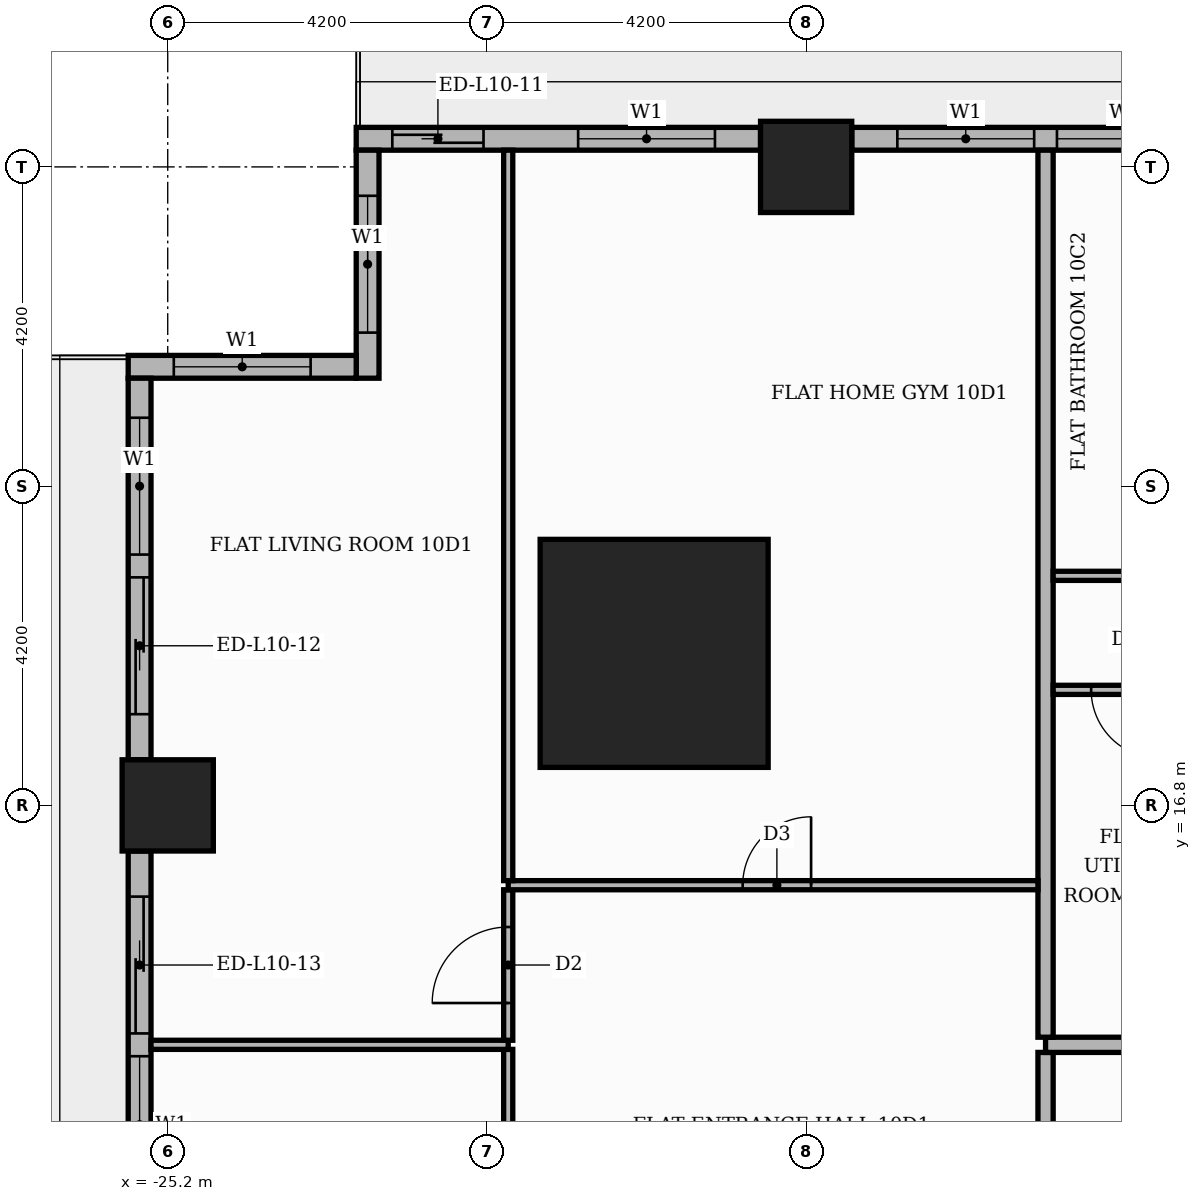
"""IFC4 building model, lengths in metres.
Left out: names, types, materials, properties, quantities, classifications, styles, units other than length and angle.
Written with IfcOpenShell. Run it as: python <this file> out.ifc"""

import sys

from ifc_helpers import new_model, si_unit, direction, frame, frame_2d, origin, origin_2d, place, context, subcontext, project, spatial, rectangle, extrude, element, fill, save


model = new_model("IFC4")
c1 = context("Model", 3, precision=1e-05, world=origin(), true_north=direction((0.0, 1.0)))
c2 = subcontext(c1, "Body", "Model", "MODEL_VIEW")
j1 = project(units=[si_unit("LENGTHUNIT", "METRE"), si_unit("PLANEANGLEUNIT", "RADIAN")], contexts=[c1])
p1 = place(None, origin())
s1 = spatial("IfcSite", under=j1, at=p1, CompositionType="ELEMENT")
p2 = place(p1, origin())
s2 = spatial("IfcBuilding", under=s1, at=p2, CompositionType="ELEMENT")
p3 = place(p2, frame((0.0, 0.0, 46.5)))
s3 = spatial("IfcBuildingStorey", under=s2, at=p3, CompositionType="ELEMENT", Elevation=46.5)
p4 = place(p3, frame((-18.8, 18.8, 0.0), z_axis=(0.0, 0.0, 1.0), x_axis=(1.0, 0.0, 0.0)))
e1 = element("IfcColumn", 1, at=p4, inside=s3, PredefinedType="COLUMN", context=c2, shape_type="SweptSolid", body=[
    extrude(rectangle(XDim=3.0, YDim=3.0, at=origin_2d()), origin(), (0.0, 0.0, 1.0), 3.9),
])
for number, where, z_axis, x_axis in (
    (2, (-16.8, 25.2, 0.0), (0.0, 0.0, 1.0), (1.0, 0.0, 0.0)),
    (3, (-25.2, 16.8, 0.0), (0.0, 0.0, 1.0), (1.0, 0.0, 0.0)),
):
    element("IfcColumn", number, at=place(p3, frame(where, z_axis=z_axis, x_axis=x_axis)), inside=s3, PredefinedType="COLUMN", context=c2, shape_type="SweptSolid", body=[
        extrude(rectangle(XDim=1.2, YDim=1.2, at=origin_2d()), origin(), (0.0, 0.0, 1.0), 3.9),
    ])
p5 = place(p3, frame((-9.0, 25.57, 0.0), z_axis=(0.0, 0.0, 1.0), x_axis=(-1.0, 0.0, 0.0)))
e4 = element("IfcWall", 4, at=p5, inside=s3, PredefinedType="STANDARD", context=c2, shape_type="SweptSolid", body=[
    extrude(rectangle(XDim=7.2, YDim=0.3, at=frame_2d((3.6, 0.0))), origin(), (0.0, 0.0, 1.0), 3.48),
])
p6 = place(p5, frame((0.6, 0.0, 0.9)))
e5 = element("IfcOpeningElement", 5, at=p6, cuts=e4, PredefinedType="OPENING", context=c2, shape_type="SweptSolid", body=[
    extrude(rectangle(XDim=1.8, YDim=2.1, at=frame_2d((0.9, 1.05))), frame((0.0, 0.16, 0.0), z_axis=(0.0, -1.0, 0.0), x_axis=(1.0, 0.0, 0.0)), (0.0, 0.0, 1.0), 0.32),
])
p7 = place(p5, frame((2.7, 0.0, 0.9)))
e6 = element("IfcOpeningElement", 6, at=p7, cuts=e4, PredefinedType="OPENING", context=c2, shape_type="SweptSolid", body=[
    extrude(rectangle(XDim=1.8, YDim=2.1, at=frame_2d((0.9, 1.05))), frame((0.0, 0.16, 0.0), z_axis=(0.0, -1.0, 0.0), x_axis=(1.0, 0.0, 0.0)), (0.0, 0.0, 1.0), 0.32),
])
p8 = place(p5, frame((4.8, 0.0, 0.9)))
e7 = element("IfcOpeningElement", 7, at=p8, cuts=e4, PredefinedType="OPENING", context=c2, shape_type="SweptSolid", body=[
    extrude(rectangle(XDim=1.8, YDim=2.1, at=frame_2d((0.9, 1.05))), frame((0.0, 0.16, 0.0), z_axis=(0.0, -1.0, 0.0), x_axis=(1.0, 0.0, 0.0)), (0.0, 0.0, 1.0), 0.32),
])
p9 = place(p3, frame((-17.4, 25.57, 0.0), z_axis=(0.0, 0.0, 1.0), x_axis=(-1.0, 0.0, 0.0)))
e8 = element("IfcWall", 8, at=p9, inside=s3, PredefinedType="STANDARD", context=c2, shape_type="SweptSolid", body=[
    extrude(rectangle(XDim=5.32, YDim=0.3, at=frame_2d((2.66, 0.0))), origin(), (0.0, 0.0, 1.0), 3.48),
])
p10 = place(p9, frame((0.6, 0.0, 0.9)))
e9 = element("IfcOpeningElement", 9, at=p10, cuts=e8, PredefinedType="OPENING", context=c2, shape_type="SweptSolid", body=[
    extrude(rectangle(XDim=1.8, YDim=2.1, at=frame_2d((0.9, 1.05))), frame((0.0, 0.16, 0.0), z_axis=(0.0, -1.0, 0.0), x_axis=(1.0, 0.0, 0.0)), (0.0, 0.0, 1.0), 0.32),
])
p11 = place(p9, frame((3.645, 0.0, 0.0)))
e10 = element("IfcOpeningElement", 10, at=p11, cuts=e8, PredefinedType="OPENING", context=c2, shape_type="SweptSolid", body=[
    extrude(rectangle(XDim=1.2, YDim=2.4, at=frame_2d((0.6, 1.2))), frame((0.0, 0.16, 0.0), z_axis=(0.0, -1.0, 0.0), x_axis=(1.0, 0.0, 0.0)), (0.0, 0.0, 1.0), 0.32),
])
p12 = place(p3, frame((-22.57, 25.42, 0.0), z_axis=(0.0, 0.0, 1.0), x_axis=(0.0, -1.0, 0.0)))
e11 = element("IfcWall", 11, at=p12, inside=s3, PredefinedType="STANDARD", context=c2, shape_type="SweptSolid", body=[
    extrude(rectangle(XDim=3.0, YDim=0.3, at=frame_2d((1.5, 0.0))), origin(), (0.0, 0.0, 1.0), 3.48),
])
p13 = place(p12, frame((0.6, 0.0, 0.9)))
e12 = element("IfcOpeningElement", 12, at=p13, cuts=e11, PredefinedType="OPENING", context=c2, shape_type="SweptSolid", body=[
    extrude(rectangle(XDim=1.8, YDim=2.1, at=frame_2d((0.9, 1.05))), frame((0.0, 0.16, 0.0), z_axis=(0.0, -1.0, 0.0), x_axis=(1.0, 0.0, 0.0)), (0.0, 0.0, 1.0), 0.32),
])
p14 = place(p3, frame((-22.72, 22.57, 0.0), z_axis=(0.0, 0.0, 1.0), x_axis=(-1.0, 0.0, 0.0)))
e13 = element("IfcWall", 13, at=p14, inside=s3, PredefinedType="STANDARD", context=c2, shape_type="SweptSolid", body=[
    extrude(rectangle(XDim=3.0, YDim=0.3, at=frame_2d((1.5, 0.0))), origin(), (0.0, 0.0, 1.0), 3.48),
])
p15 = place(p14, frame((0.6, 0.0, 0.9)))
e14 = element("IfcOpeningElement", 14, at=p15, cuts=e13, PredefinedType="OPENING", context=c2, shape_type="SweptSolid", body=[
    extrude(rectangle(XDim=1.8, YDim=2.1, at=frame_2d((0.9, 1.05))), frame((0.0, 0.16, 0.0), z_axis=(0.0, -1.0, 0.0), x_axis=(1.0, 0.0, 0.0)), (0.0, 0.0, 1.0), 0.32),
])
p16 = place(p3, frame((-25.57, 22.42, 0.0), z_axis=(0.0, 0.0, 1.0), x_axis=(0.0, -1.0, 0.0)))
e15 = element("IfcWall", 15, at=p16, inside=s3, PredefinedType="STANDARD", context=c2, shape_type="SweptSolid", body=[
    extrude(rectangle(XDim=5.02, YDim=0.3, at=frame_2d((2.51, 0.0))), origin(), (0.0, 0.0, 1.0), 3.48),
])
p17 = place(p16, frame((0.52, 0.0, 0.9)))
e16 = element("IfcOpeningElement", 16, at=p17, cuts=e15, PredefinedType="OPENING", context=c2, shape_type="SweptSolid", body=[
    extrude(rectangle(XDim=1.8, YDim=2.1, at=frame_2d((0.9, 1.05))), frame((0.0, 0.16, 0.0), z_axis=(0.0, -1.0, 0.0), x_axis=(1.0, 0.0, 0.0)), (0.0, 0.0, 1.0), 0.32),
])
p18 = place(p16, frame((2.62, 0.0, 0.0)))
e17 = element("IfcOpeningElement", 17, at=p18, cuts=e15, PredefinedType="OPENING", context=c2, shape_type="SweptSolid", body=[
    extrude(rectangle(XDim=1.8, YDim=2.4, at=frame_2d((0.9, 1.2))), frame((0.0, 0.16, 0.0), z_axis=(0.0, -1.0, 0.0), x_axis=(1.0, 0.0, 0.0)), (0.0, 0.0, 1.0), 0.32),
])
p19 = place(p3, frame((-25.57, 16.2, 0.0), z_axis=(0.0, 0.0, 1.0), x_axis=(0.0, -1.0, 0.0)))
e18 = element("IfcWall", 18, at=p19, inside=s3, PredefinedType="STANDARD", context=c2, shape_type="SweptSolid", body=[
    extrude(rectangle(XDim=7.2, YDim=0.3, at=frame_2d((3.6, 0.0))), origin(), (0.0, 0.0, 1.0), 3.48),
])
p20 = place(p19, frame((0.6, 0.0, 0.0)))
e19 = element("IfcOpeningElement", 19, at=p20, cuts=e18, PredefinedType="OPENING", context=c2, shape_type="SweptSolid", body=[
    extrude(rectangle(XDim=1.8, YDim=2.4, at=frame_2d((0.9, 1.2))), frame((0.0, 0.16, 0.0), z_axis=(0.0, -1.0, 0.0), x_axis=(1.0, 0.0, 0.0)), (0.0, 0.0, 1.0), 0.32),
])
p21 = place(p19, frame((2.7, 0.0, 0.9)))
e20 = element("IfcOpeningElement", 20, at=p21, cuts=e18, PredefinedType="OPENING", context=c2, shape_type="SweptSolid", body=[
    extrude(rectangle(XDim=1.8, YDim=2.1, at=frame_2d((0.9, 1.05))), frame((0.0, 0.16, 0.0), z_axis=(0.0, -1.0, 0.0), x_axis=(1.0, 0.0, 0.0)), (0.0, 0.0, 1.0), 0.32),
])
p22 = place(p19, frame((4.8, 0.0, 0.0)))
e21 = element("IfcOpeningElement", 21, at=p22, cuts=e18, PredefinedType="OPENING", context=c2, shape_type="SweptSolid", body=[
    extrude(rectangle(XDim=1.8, YDim=2.4, at=frame_2d((0.9, 1.2))), frame((0.0, 0.16, 0.0), z_axis=(0.0, -1.0, 0.0), x_axis=(1.0, 0.0, 0.0)), (0.0, 0.0, 1.0), 0.32),
])
p23 = place(p3, frame((-13.65, -13.55, 0.0), z_axis=(0.0, 0.0, 1.0), x_axis=(0.0, 1.0, 0.0)))
e22 = element("IfcWall", 22, at=p23, inside=s3, PredefinedType="PARTITIONING", context=c2, shape_type="SweptSolid", body=[
    extrude(rectangle(XDim=27.1, YDim=0.2, at=frame_2d((13.55, 0.0))), origin(), (0.0, 0.0, 1.0), 3.48),
])
p24 = place(p23, frame((24.55, 0.0, 0.0)))
e23 = element("IfcOpeningElement", 23, at=p24, cuts=e22, PredefinedType="OPENING", context=c2, shape_type="SweptSolid", body=[
    extrude(rectangle(XDim=1.1, YDim=2.4, at=frame_2d((0.55, 1.2))), frame((0.0, 0.11, 0.0), z_axis=(0.0, -1.0, 0.0), x_axis=(1.0, 0.0, 0.0)), (0.0, 0.0, 1.0), 0.22),
])
p25 = place(p3, frame((-20.72, 5.31, 0.0), z_axis=(0.0, 0.0, 1.0), x_axis=(0.0, 1.0, 0.0)))
e24 = element("IfcWall", 24, at=p25, inside=s3, PredefinedType="PARTITIONING", context=c2, shape_type="SweptSolid", body=[
    extrude(rectangle(XDim=8.28, YDim=0.12, at=frame_2d((4.14, 0.0))), origin(), (0.0, 0.0, 1.0), 3.48),
])
p26 = place(p25, frame((3.64, 0.0, 0.0)))
e25 = element("IfcOpeningElement", 25, at=p26, cuts=e24, PredefinedType="OPENING", context=c2, shape_type="SweptSolid", body=[
    extrude(rectangle(XDim=1.0, YDim=2.1, at=frame_2d((0.5, 1.05))), frame((0.0, 0.07, 0.0), z_axis=(0.0, -1.0, 0.0), x_axis=(1.0, 0.0, 0.0)), (0.0, 0.0, 1.0), 0.14),
])
p27 = place(p3, frame((-25.42, 13.65, 0.0), z_axis=(0.0, 0.0, 1.0), x_axis=(1.0, 0.0, 0.0)))
e26 = element("IfcWall", 26, at=p27, inside=s3, PredefinedType="PARTITIONING", context=c2, shape_type="SweptSolid", body=[
    extrude(rectangle(XDim=4.7, YDim=0.12, at=frame_2d((2.35, 0.0))), origin(), (0.0, 0.0, 1.0), 3.48),
])
p28 = place(p3, frame((-13.65, 13.65, 0.0), z_axis=(0.0, 0.0, 1.0), x_axis=(1.0, 0.0, 0.0)))
e27 = element("IfcWall", 27, at=p28, inside=s3, PredefinedType="PARTITIONING", context=c2, shape_type="SweptSolid", body=[
    extrude(rectangle(XDim=39.07, YDim=0.2, at=frame_2d((19.535, 0.0))), origin(), (0.0, 0.0, 1.0), 3.48),
])
p29 = place(p28, frame((24.65, 0.0, 0.0)))
e28 = element("IfcOpeningElement", 28, at=p29, cuts=e27, PredefinedType="OPENING", context=c2, shape_type="SweptSolid", body=[
    extrude(rectangle(XDim=1.1, YDim=2.4, at=frame_2d((0.55, 1.2))), frame((0.0, 0.11, 0.0), z_axis=(0.0, -1.0, 0.0), x_axis=(1.0, 0.0, 0.0)), (0.0, 0.0, 1.0), 0.22),
])
p30 = place(p28, frame((14.15, 0.0, 0.0)))
e29 = element("IfcOpeningElement", 29, at=p30, cuts=e27, PredefinedType="OPENING", context=c2, shape_type="SweptSolid", body=[
    extrude(rectangle(XDim=1.1, YDim=2.4, at=frame_2d((0.55, 1.2))), frame((0.0, 0.11, 0.0), z_axis=(0.0, -1.0, 0.0), x_axis=(1.0, 0.0, 0.0)), (0.0, 0.0, 1.0), 0.22),
])
p31 = place(p3, frame((-20.72, 13.71, 0.0), z_axis=(0.0, 0.0, 1.0), x_axis=(0.0, 1.0, 0.0)))
e30 = element("IfcWall", 30, at=p31, inside=s3, PredefinedType="PARTITIONING", context=c2, shape_type="SweptSolid", body=[
    extrude(rectangle(XDim=1.98, YDim=0.12, at=frame_2d((0.99, 0.0))), origin(), (0.0, 0.0, 1.0), 3.48),
])
p32 = place(p31, frame((0.49, 0.0, 0.0)))
e31 = element("IfcOpeningElement", 31, at=p32, cuts=e30, PredefinedType="OPENING", context=c2, shape_type="SweptSolid", body=[
    extrude(rectangle(XDim=1.0, YDim=2.1, at=frame_2d((0.5, 1.05))), frame((0.0, 0.07, 0.0), z_axis=(0.0, -1.0, 0.0), x_axis=(1.0, 0.0, 0.0)), (0.0, 0.0, 1.0), 0.14),
])
p33 = place(p3, frame((-13.65, 13.75, 0.0), z_axis=(0.0, 0.0, 1.0), x_axis=(0.0, 1.0, 0.0)))
e32 = element("IfcWall", 32, at=p33, inside=s3, PredefinedType="PARTITIONING", context=c2, shape_type="SweptSolid", body=[
    extrude(rectangle(XDim=11.67, YDim=0.2, at=frame_2d((5.835, 0.0))), origin(), (0.0, 0.0, 1.0), 3.48),
])
p34 = place(p3, frame((-20.72, 15.75, 0.0), z_axis=(0.0, 0.0, 1.0), x_axis=(1.0, 0.0, 0.0)))
e33 = element("IfcWall", 33, at=p34, inside=s3, PredefinedType="PARTITIONING", context=c2, shape_type="SweptSolid", body=[
    extrude(rectangle(XDim=6.97, YDim=0.12, at=frame_2d((3.485, 0.0))), origin(), (0.0, 0.0, 1.0), 3.48),
])
p35 = place(p34, frame((3.085, 0.0, 0.0)))
e34 = element("IfcOpeningElement", 34, at=p35, cuts=e33, PredefinedType="OPENING", context=c2, shape_type="SweptSolid", body=[
    extrude(rectangle(XDim=0.9, YDim=2.1, at=frame_2d((0.45, 1.05))), frame((0.0, 0.07, 0.0), z_axis=(0.0, -1.0, 0.0), x_axis=(1.0, 0.0, 0.0)), (0.0, 0.0, 1.0), 0.14),
])
p36 = place(p3, frame((-20.72, 15.81, 0.0), z_axis=(0.0, 0.0, 1.0), x_axis=(0.0, 1.0, 0.0)))
e35 = element("IfcWall", 35, at=p36, inside=s3, PredefinedType="PARTITIONING", context=c2, shape_type="SweptSolid", body=[
    extrude(rectangle(XDim=9.61, YDim=0.12, at=frame_2d((4.805, 0.0))), origin(), (0.0, 0.0, 1.0), 3.48),
])
p37 = place(p3, frame((-13.55, 18.32, 0.0), z_axis=(0.0, 0.0, 1.0), x_axis=(1.0, 0.0, 0.0)))
e36 = element("IfcWall", 36, at=p37, inside=s3, PredefinedType="PARTITIONING", context=c2, shape_type="SweptSolid", body=[
    extrude(rectangle(XDim=12.5, YDim=0.12, at=frame_2d((6.25, 0.0))), origin(), (0.0, 0.0, 1.0), 3.48),
])
p38 = place(p37, frame((8.825, 0.0, 0.0)))
e37 = element("IfcOpeningElement", 37, at=p38, cuts=e36, PredefinedType="OPENING", context=c2, shape_type="SweptSolid", body=[
    extrude(rectangle(XDim=0.9, YDim=2.1, at=frame_2d((0.45, 1.05))), frame((0.0, 0.07, 0.0), z_axis=(0.0, -1.0, 0.0), x_axis=(1.0, 0.0, 0.0)), (0.0, 0.0, 1.0), 0.14),
])
p39 = place(p37, frame((4.625, 0.0, 0.0)))
e38 = element("IfcOpeningElement", 38, at=p39, cuts=e36, PredefinedType="OPENING", context=c2, shape_type="SweptSolid", body=[
    extrude(rectangle(XDim=0.9, YDim=2.1, at=frame_2d((0.45, 1.05))), frame((0.0, 0.07, 0.0), z_axis=(0.0, -1.0, 0.0), x_axis=(1.0, 0.0, 0.0)), (0.0, 0.0, 1.0), 0.14),
])
p40 = place(p37, frame((2.6, 0.0, 0.0)))
e39 = element("IfcOpeningElement", 39, at=p40, cuts=e36, PredefinedType="OPENING", context=c2, shape_type="SweptSolid", body=[
    extrude(rectangle(XDim=0.9, YDim=2.1, at=frame_2d((0.45, 1.05))), frame((0.0, 0.07, 0.0), z_axis=(0.0, -1.0, 0.0), x_axis=(1.0, 0.0, 0.0)), (0.0, 0.0, 1.0), 0.14),
])
p41 = place(p37, frame((0.5, 0.0, 0.0)))
e40 = element("IfcOpeningElement", 40, at=p41, cuts=e36, PredefinedType="OPENING", context=c2, shape_type="SweptSolid", body=[
    extrude(rectangle(XDim=0.9, YDim=2.1, at=frame_2d((0.45, 1.05))), frame((0.0, 0.07, 0.0), z_axis=(0.0, -1.0, 0.0), x_axis=(1.0, 0.0, 0.0)), (0.0, 0.0, 1.0), 0.14),
])
p42 = place(p3, frame((-13.55, 19.82, 0.0), z_axis=(0.0, 0.0, 1.0), x_axis=(1.0, 0.0, 0.0)))
e41 = element("IfcWall", 41, at=p42, inside=s3, PredefinedType="PARTITIONING", context=c2, shape_type="SweptSolid", body=[
    extrude(rectangle(XDim=18.7, YDim=0.12, at=frame_2d((9.35, 0.0))), origin(), (0.0, 0.0, 1.0), 3.48),
])
p43 = place(p42, frame((16.2, 0.0, 0.0)))
e42 = element("IfcOpeningElement", 42, at=p43, cuts=e41, PredefinedType="OPENING", context=c2, shape_type="SweptSolid", body=[
    extrude(rectangle(XDim=1.0, YDim=2.1, at=frame_2d((0.5, 1.05))), frame((0.0, 0.07, 0.0), z_axis=(0.0, -1.0, 0.0), x_axis=(1.0, 0.0, 0.0)), (0.0, 0.0, 1.0), 0.14),
])
p44 = place(p42, frame((12.05, 0.0, 0.0)))
e43 = element("IfcOpeningElement", 43, at=p44, cuts=e41, PredefinedType="OPENING", context=c2, shape_type="SweptSolid", body=[
    extrude(rectangle(XDim=0.9, YDim=2.1, at=frame_2d((0.45, 1.05))), frame((0.0, 0.07, 0.0), z_axis=(0.0, -1.0, 0.0), x_axis=(1.0, 0.0, 0.0)), (0.0, 0.0, 1.0), 0.14),
])
p45 = place(p42, frame((3.65, 0.0, 0.0)))
e44 = element("IfcOpeningElement", 44, at=p45, cuts=e41, PredefinedType="OPENING", context=c2, shape_type="SweptSolid", body=[
    extrude(rectangle(XDim=0.9, YDim=2.1, at=frame_2d((0.45, 1.05))), frame((0.0, 0.07, 0.0), z_axis=(0.0, -1.0, 0.0), x_axis=(1.0, 0.0, 0.0)), (0.0, 0.0, 1.0), 0.14),
])
p46 = place(p7, origin())
e45 = element("IfcWindow", 45, at=p46, inside=s3, PartitioningType="SINGLE_PANEL", PredefinedType="WINDOW", context=c2, shape_type="SweptSolid", body=[
    extrude(rectangle(XDim=1.8, YDim=2.1, at=frame_2d((0.9, 1.05))), frame((0.0, 0.03, 0.0), z_axis=(0.0, -1.0, 0.0), x_axis=(1.0, 0.0, 0.0)), (0.0, 0.0, 1.0), 0.06),
])
fill(e6, e45)
p47 = place(p8, origin())
e46 = element("IfcWindow", 46, at=p47, inside=s3, PartitioningType="SINGLE_PANEL", PredefinedType="WINDOW", context=c2, shape_type="SweptSolid", body=[
    extrude(rectangle(XDim=1.8, YDim=2.1, at=frame_2d((0.9, 1.05))), frame((0.0, 0.03, 0.0), z_axis=(0.0, -1.0, 0.0), x_axis=(1.0, 0.0, 0.0)), (0.0, 0.0, 1.0), 0.06),
])
fill(e7, e46)
p48 = place(p10, origin())
e47 = element("IfcWindow", 47, at=p48, inside=s3, PartitioningType="SINGLE_PANEL", PredefinedType="WINDOW", context=c2, shape_type="SweptSolid", body=[
    extrude(rectangle(XDim=1.8, YDim=2.1, at=frame_2d((0.9, 1.05))), frame((0.0, 0.03, 0.0), z_axis=(0.0, -1.0, 0.0), x_axis=(1.0, 0.0, 0.0)), (0.0, 0.0, 1.0), 0.06),
])
fill(e9, e47)
p49 = place(p11, origin())
e48 = element("IfcDoor", 48, at=p49, inside=s3, OperationType="SLIDING_TO_RIGHT", PredefinedType="DOOR", context=c2, shape_type="SweptSolid", body=[
    extrude(rectangle(XDim=1.2, YDim=2.4, at=frame_2d((0.6, 1.2))), frame((0.0, 0.025, 0.0), z_axis=(0.0, -1.0, 0.0), x_axis=(1.0, 0.0, 0.0)), (0.0, 0.0, 1.0), 0.05),
])
fill(e10, e48)
p50 = place(p13, origin())
e49 = element("IfcWindow", 49, at=p50, inside=s3, PartitioningType="SINGLE_PANEL", PredefinedType="WINDOW", context=c2, shape_type="SweptSolid", body=[
    extrude(rectangle(XDim=1.8, YDim=2.1, at=frame_2d((0.9, 1.05))), frame((0.0, 0.03, 0.0), z_axis=(0.0, -1.0, 0.0), x_axis=(1.0, 0.0, 0.0)), (0.0, 0.0, 1.0), 0.06),
])
fill(e12, e49)
p51 = place(p15, origin())
e50 = element("IfcWindow", 50, at=p51, inside=s3, PartitioningType="SINGLE_PANEL", PredefinedType="WINDOW", context=c2, shape_type="SweptSolid", body=[
    extrude(rectangle(XDim=1.8, YDim=2.1, at=frame_2d((0.9, 1.05))), frame((0.0, 0.03, 0.0), z_axis=(0.0, -1.0, 0.0), x_axis=(1.0, 0.0, 0.0)), (0.0, 0.0, 1.0), 0.06),
])
fill(e14, e50)
p52 = place(p17, origin())
e51 = element("IfcWindow", 51, at=p52, inside=s3, PartitioningType="SINGLE_PANEL", PredefinedType="WINDOW", context=c2, shape_type="SweptSolid", body=[
    extrude(rectangle(XDim=1.8, YDim=2.1, at=frame_2d((0.9, 1.05))), frame((0.0, 0.03, 0.0), z_axis=(0.0, -1.0, 0.0), x_axis=(1.0, 0.0, 0.0)), (0.0, 0.0, 1.0), 0.06),
])
fill(e16, e51)
p53 = place(p18, origin())
e52 = element("IfcDoor", 52, at=p53, inside=s3, OperationType="SLIDING_TO_RIGHT", PredefinedType="DOOR", context=c2, shape_type="SweptSolid", body=[
    extrude(rectangle(XDim=1.8, YDim=2.4, at=frame_2d((0.9, 1.2))), frame((0.0, 0.025, 0.0), z_axis=(0.0, -1.0, 0.0), x_axis=(1.0, 0.0, 0.0)), (0.0, 0.0, 1.0), 0.05),
])
fill(e17, e52)
p54 = place(p20, origin())
e53 = element("IfcDoor", 53, at=p54, inside=s3, OperationType="SLIDING_TO_LEFT", PredefinedType="DOOR", context=c2, shape_type="SweptSolid", body=[
    extrude(rectangle(XDim=1.8, YDim=2.4, at=frame_2d((0.9, 1.2))), frame((0.0, 0.025, 0.0), z_axis=(0.0, -1.0, 0.0), x_axis=(1.0, 0.0, 0.0)), (0.0, 0.0, 1.0), 0.05),
])
fill(e19, e53)
p55 = place(p21, origin())
e54 = element("IfcWindow", 54, at=p55, inside=s3, PartitioningType="SINGLE_PANEL", PredefinedType="WINDOW", context=c2, shape_type="SweptSolid", body=[
    extrude(rectangle(XDim=1.8, YDim=2.1, at=frame_2d((0.9, 1.05))), frame((0.0, 0.03, 0.0), z_axis=(0.0, -1.0, 0.0), x_axis=(1.0, 0.0, 0.0)), (0.0, 0.0, 1.0), 0.06),
])
fill(e20, e54)
p56 = place(p41, frame((0.9, 0.0, 0.0), z_axis=(0.0, 0.0, 1.0), x_axis=(-1.0, 0.0, 0.0)))
e55 = element("IfcDoor", 55, at=p56, inside=s3, OperationType="SINGLE_SWING_RIGHT", PredefinedType="DOOR", context=c2, shape_type="SweptSolid", body=[
    extrude(rectangle(XDim=0.9, YDim=2.1, at=frame_2d((0.45, 1.05))), frame((0.0, 0.025, 0.0), z_axis=(0.0, -1.0, 0.0), x_axis=(1.0, 0.0, 0.0)), (0.0, 0.0, 1.0), 0.05),
])
fill(e40, e55)
p57 = place(p35, origin())
e56 = element("IfcDoor", 56, at=p57, inside=s3, OperationType="SINGLE_SWING_RIGHT", PredefinedType="DOOR", context=c2, shape_type="SweptSolid", body=[
    extrude(rectangle(XDim=0.9, YDim=2.1, at=frame_2d((0.45, 1.05))), frame((0.0, 0.025, 0.0), z_axis=(0.0, -1.0, 0.0), x_axis=(1.0, 0.0, 0.0)), (0.0, 0.0, 1.0), 0.05),
])
fill(e34, e56)
p58 = place(p32, origin())
e57 = element("IfcDoor", 57, at=p58, inside=s3, OperationType="SINGLE_SWING_LEFT", PredefinedType="DOOR", context=c2, shape_type="SweptSolid", body=[
    extrude(rectangle(XDim=1.0, YDim=2.1, at=frame_2d((0.5, 1.05))), frame((0.0, 0.025, 0.0), z_axis=(0.0, -1.0, 0.0), x_axis=(1.0, 0.0, 0.0)), (0.0, 0.0, 1.0), 0.05),
])
fill(e31, e57)
save(model, sys.argv[1])
